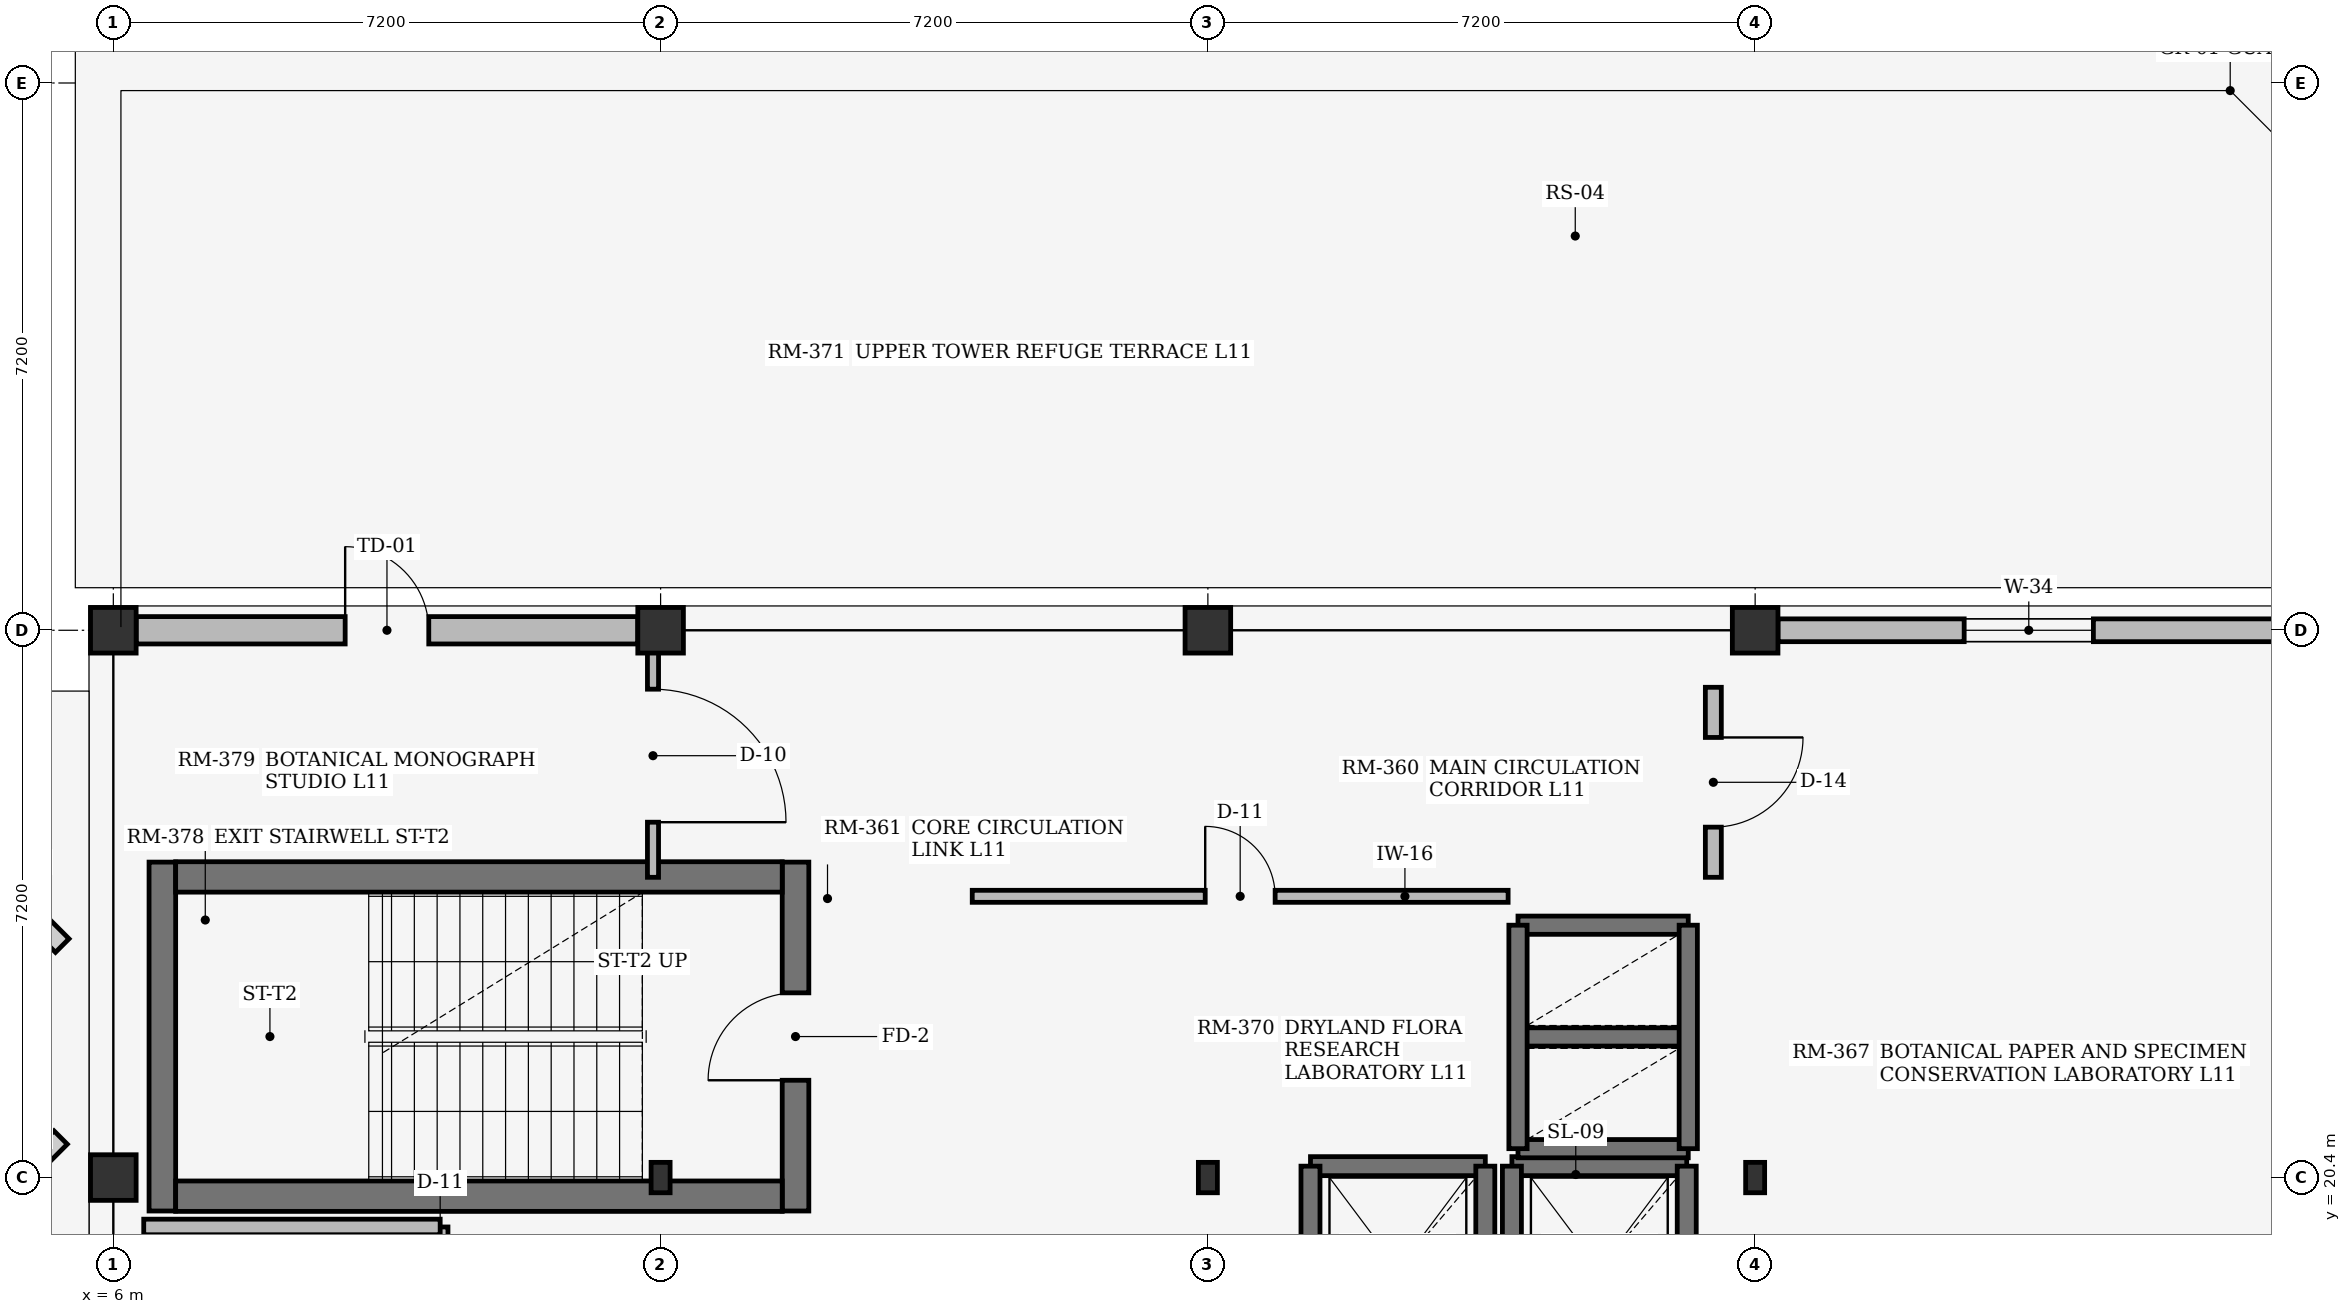
"""IFC4 building model, lengths in metres.
Left out: names, types, materials, properties, quantities, classifications, styles, units other than length and angle.
Written with IfcOpenShell. Run it as: python <this file> out.ifc"""

import sys

from ifc_helpers import new_model, si_unit, direction, frame, frame_2d, origin, origin_2d, place, context, subcontext, project, spatial, rectangle, i_section, extrude, element, fill, save


model = new_model("IFC4")
c1 = context("Model", 3, precision=1e-05, world=origin(), true_north=direction((0.0, 1.0)))
c2 = subcontext(c1, "Body", "Model", "MODEL_VIEW")
j1 = project(units=[si_unit("LENGTHUNIT", "METRE"), si_unit("PLANEANGLEUNIT", "RADIAN")], contexts=[c1])
p1 = place(None, origin())
s1 = spatial("IfcSite", under=j1, at=p1, CompositionType="ELEMENT")
p2 = place(p1, origin())
s2 = spatial("IfcBuilding", under=s1, at=p2, CompositionType="ELEMENT")
p3 = place(p2, frame((0.0, 0.0, 44.4)))
s3 = spatial("IfcBuildingStorey", under=s2, at=p3, CompositionType="ELEMENT", Elevation=44.4)
for number, where, z_axis, x_axis in (
    (1, (6.0, 20.4, 0.0), (0.0, 0.0, 1.0), (1.0, 0.0, 0.0)),
    (2, (6.0, 27.6, 0.0), (0.0, 0.0, 1.0), (1.0, 0.0, 0.0)),
):
    element("IfcColumn", number, at=place(p3, frame(where, z_axis=z_axis, x_axis=x_axis)), inside=s3, PredefinedType="COLUMN", context=c2, shape_type="SweptSolid", body=[
        extrude(rectangle(XDim=0.6, YDim=0.6, at=origin_2d()), origin(), (0.0, 0.0, 1.0), 3.69),
    ])
p4 = place(p3, frame((13.2, 20.4, 0.0), z_axis=(0.0, 0.0, 1.0), x_axis=(1.0, 0.0, 0.0)))
e3 = element("IfcColumn", 3, at=p4, inside=s3, PredefinedType="COLUMN", context=c2, shape_type="SweptSolid", body=[
    extrude(i_section(OverallWidth=0.25, OverallDepth=0.4, WebThickness=0.01, FlangeThickness=0.013, at=origin_2d()), origin(), (0.0, 0.0, 1.0), 3.69),
])
p5 = place(p3, frame((13.2, 27.6, 0.0), z_axis=(0.0, 0.0, 1.0), x_axis=(1.0, 0.0, 0.0)))
e4 = element("IfcColumn", 4, at=p5, inside=s3, PredefinedType="COLUMN", context=c2, shape_type="SweptSolid", body=[
    extrude(rectangle(XDim=0.6, YDim=0.6, at=origin_2d()), origin(), (0.0, 0.0, 1.0), 3.69),
])
p6 = place(p3, frame((20.4, 20.4, 0.0), z_axis=(0.0, 0.0, 1.0), x_axis=(1.0, 0.0, 0.0)))
e5 = element("IfcColumn", 5, at=p6, inside=s3, PredefinedType="COLUMN", context=c2, shape_type="SweptSolid", body=[
    extrude(i_section(OverallWidth=0.25, OverallDepth=0.4, WebThickness=0.01, FlangeThickness=0.013, at=origin_2d()), origin(), (0.0, 0.0, 1.0), 3.69),
])
p7 = place(p3, frame((20.4, 27.6, 0.0), z_axis=(0.0, 0.0, 1.0), x_axis=(1.0, 0.0, 0.0)))
e6 = element("IfcColumn", 6, at=p7, inside=s3, PredefinedType="COLUMN", context=c2, shape_type="SweptSolid", body=[
    extrude(rectangle(XDim=0.6, YDim=0.6, at=origin_2d()), origin(), (0.0, 0.0, 1.0), 3.69),
])
p8 = place(p3, frame((27.6, 20.4, 0.0), z_axis=(0.0, 0.0, 1.0), x_axis=(1.0, 0.0, 0.0)))
e7 = element("IfcColumn", 7, at=p8, inside=s3, PredefinedType="COLUMN", context=c2, shape_type="SweptSolid", body=[
    extrude(i_section(OverallWidth=0.25, OverallDepth=0.4, WebThickness=0.01, FlangeThickness=0.013, at=origin_2d()), origin(), (0.0, 0.0, 1.0), 3.69),
])
p9 = place(p3, frame((27.6, 27.6, 0.0), z_axis=(0.0, 0.0, 1.0), x_axis=(1.0, 0.0, 0.0)))
e8 = element("IfcColumn", 8, at=p9, inside=s3, PredefinedType="COLUMN", context=c2, shape_type="SweptSolid", body=[
    extrude(rectangle(XDim=0.6, YDim=0.6, at=origin_2d()), origin(), (0.0, 0.0, 1.0), 3.69),
])
p10 = place(p3, frame((6.3, 27.6, 0.0), z_axis=(0.0, 0.0, 1.0), x_axis=(1.0, 0.0, 0.0)))
e9 = element("IfcWall", 9, at=p10, inside=s3, PredefinedType="STANDARD", context=c2, shape_type="SweptSolid", body=[
    extrude(rectangle(XDim=6.6, YDim=0.36, at=frame_2d((3.3, 0.0))), origin(), (0.0, 0.0, 1.0), 3.17),
])
p11 = place(p10, frame((2.75, 0.0, 0.0)))
e10 = element("IfcOpeningElement", 10, at=p11, cuts=e9, PredefinedType="OPENING", context=c2, shape_type="SweptSolid", body=[
    extrude(rectangle(XDim=1.1, YDim=2.15, at=frame_2d((0.55, 1.075))), frame((0.0, 0.19, 0.0), z_axis=(0.0, -1.0, 0.0), x_axis=(1.0, 0.0, 0.0)), (0.0, 0.0, 1.0), 0.38),
])
p12 = place(p3, frame((27.9, 27.6, 0.0), z_axis=(0.0, 0.0, 1.0), x_axis=(1.0, 0.0, 0.0)))
e11 = element("IfcWall", 11, at=p12, inside=s3, PredefinedType="STANDARD", context=c2, shape_type="SweptSolid", body=[
    extrude(rectangle(XDim=6.6, YDim=0.3, at=frame_2d((3.3, 0.0))), origin(), (0.0, 0.0, 1.0), 3.17),
])
p13 = place(p12, frame((2.45, 0.0, 0.75)))
e12 = element("IfcOpeningElement", 12, at=p13, cuts=e11, PredefinedType="OPENING", context=c2, shape_type="SweptSolid", body=[
    extrude(rectangle(XDim=1.7, YDim=1.35, at=frame_2d((0.85, 0.675))), frame((0.0, 0.16, 0.0), z_axis=(0.0, -1.0, 0.0), x_axis=(1.0, 0.0, 0.0)), (0.0, 0.0, 1.0), 0.32),
])
p14 = place(p3, frame((14.975, 24.55, 0.0), z_axis=(0.0, 0.0, 1.0), x_axis=(0.0, -1.0, 0.0)))
e13 = element("IfcWall", 13, at=p14, inside=s3, PredefinedType="SHEAR", context=c2, shape_type="SweptSolid", body=[
    extrude(rectangle(XDim=4.59, YDim=0.35, at=frame_2d((2.295, 0.0))), origin(), (0.0, 0.0, 1.0), 3.69),
])
p15 = place(p14, frame((1.72, 0.0, 0.0)))
e14 = element("IfcOpeningElement", 14, at=p15, cuts=e13, PredefinedType="OPENING", context=c2, shape_type="SweptSolid", body=[
    extrude(rectangle(XDim=1.15, YDim=2.2, at=frame_2d((0.575, 1.1))), frame((0.0, 0.185, 0.0), z_axis=(0.0, -1.0, 0.0), x_axis=(1.0, 0.0, 0.0)), (0.0, 0.0, 1.0), 0.37),
])
p16 = place(p3, frame((6.645, 24.55, 0.0), z_axis=(0.0, 0.0, 1.0), x_axis=(0.0, -1.0, 0.0)))
e15 = element("IfcWall", 15, at=p16, inside=s3, PredefinedType="SHEAR", context=c2, shape_type="SweptSolid", body=[
    extrude(rectangle(XDim=4.59, YDim=0.35, at=frame_2d((2.295, 0.0))), origin(), (0.0, 0.0, 1.0), 3.69),
])
for number, where, z_axis, x_axis in (
    (16, (14.8, 24.355, 0.0), (0.0, 0.0, 1.0), (-1.0, 0.0, 0.0)),
    (17, (14.8, 20.155, 0.0), (0.0, 0.0, 1.0), (-1.0, 0.0, 0.0)),
):
    element("IfcWall", number, at=place(p3, frame(where, z_axis=z_axis, x_axis=x_axis)), inside=s3, PredefinedType="SHEAR", context=c2, shape_type="SweptSolid", body=[
        extrude(rectangle(XDim=7.98, YDim=0.4, at=frame_2d((3.99, 0.0))), origin(), (0.0, 0.0, 1.0), 3.69),
    ])
p17 = place(p3, frame((21.75, 20.55, 0.0), z_axis=(0.0, 0.0, 1.0), x_axis=(1.0, 0.0, 0.0)))
e18 = element("IfcWall", 18, at=p17, inside=s3, PredefinedType="SHEAR", context=c2, shape_type="SweptSolid", body=[
    extrude(rectangle(XDim=2.3, YDim=0.25, at=frame_2d((1.15, 0.0))), origin(), (0.0, 0.0, 1.0), 3.69),
])
for number, where, z_axis, x_axis in (
    (19, (21.75, 17.85, 0.0), (0.0, 0.0, 1.0), (0.0, 1.0, 0.0)),
    (20, (24.05, 17.85, 0.0), (0.0, 0.0, 1.0), (0.0, 1.0, 0.0)),
):
    element("IfcWall", number, at=place(p3, frame(where, z_axis=z_axis, x_axis=x_axis)), inside=s3, PredefinedType="SHEAR", context=c2, shape_type="SweptSolid", body=[
        extrude(rectangle(XDim=2.7, YDim=0.25, at=frame_2d((1.35, 0.0))), origin(), (0.0, 0.0, 1.0), 3.69),
    ])
p18 = place(p3, frame((24.4, 20.55, 0.0), z_axis=(0.0, 0.0, 1.0), x_axis=(1.0, 0.0, 0.0)))
e21 = element("IfcWall", 21, at=p18, inside=s3, PredefinedType="SHEAR", context=c2, shape_type="SweptSolid", body=[
    extrude(rectangle(XDim=2.3, YDim=0.25, at=frame_2d((1.15, 0.0))), origin(), (0.0, 0.0, 1.0), 3.69),
])
for number, where, z_axis, x_axis in (
    (22, (24.4, 17.85, 0.0), (0.0, 0.0, 1.0), (0.0, 1.0, 0.0)),
    (23, (26.7, 17.85, 0.0), (0.0, 0.0, 1.0), (0.0, 1.0, 0.0)),
):
    element("IfcWall", number, at=place(p3, frame(where, z_axis=z_axis, x_axis=x_axis)), inside=s3, PredefinedType="SHEAR", context=c2, shape_type="SweptSolid", body=[
        extrude(rectangle(XDim=2.7, YDim=0.25, at=frame_2d((1.35, 0.0))), origin(), (0.0, 0.0, 1.0), 3.69),
    ])
for number, where, z_axis, x_axis in (
    (24, (24.48, 20.78, 0.0), (0.0, 0.0, 1.0), (1.0, 0.0, 0.0)),
    (25, (24.48, 22.25, 0.0), (0.0, 0.0, 1.0), (1.0, 0.0, 0.0)),
    (26, (24.48, 23.72, 0.0), (0.0, 0.0, 1.0), (1.0, 0.0, 0.0)),
):
    element("IfcWall", number, at=place(p3, frame(where, z_axis=z_axis, x_axis=x_axis)), inside=s3, PredefinedType="SHEAR", context=c2, shape_type="SweptSolid", body=[
        extrude(rectangle(XDim=2.24, YDim=0.24, at=frame_2d((1.12, 0.0))), origin(), (0.0, 0.0, 1.0), 3.69),
    ])
for number, where, z_axis, x_axis in (
    (27, (24.48, 20.78, 0.0), (0.0, 0.0, 1.0), (0.0, 1.0, 0.0)),
    (28, (26.72, 20.78, 0.0), (0.0, 0.0, 1.0), (0.0, 1.0, 0.0)),
):
    element("IfcWall", number, at=place(p3, frame(where, z_axis=z_axis, x_axis=x_axis)), inside=s3, PredefinedType="SHEAR", context=c2, shape_type="SweptSolid", body=[
        extrude(rectangle(XDim=2.94, YDim=0.24, at=frame_2d((1.47, 0.0))), origin(), (0.0, 0.0, 1.0), 3.69),
    ])
p19 = place(p3, frame((10.3, 18.0, 0.0), z_axis=(0.0, 0.0, 1.0), x_axis=(0.0, 1.0, 0.0)))
e29 = element("IfcWall", 29, at=p19, inside=s3, PredefinedType="PLUMBINGWALL", context=c2, shape_type="SweptSolid", body=[
    extrude(rectangle(XDim=1.75, YDim=0.205, at=frame_2d((0.875, 0.0))), origin(), (0.0, 0.0, 1.0), 3.67),
])
p20 = place(p19, frame((0.415, 0.0, 0.0)))
e30 = element("IfcOpeningElement", 30, at=p20, cuts=e29, PredefinedType="OPENING", context=c2, shape_type="SweptSolid", body=[
    extrude(rectangle(XDim=0.92, YDim=2.1, at=frame_2d((0.46, 1.05))), frame((0.0, 0.113, 0.0), z_axis=(0.0, -1.0, 0.0), x_axis=(1.0, 0.0, 0.0)), (0.0, 0.0, 1.0), 0.225),
])
p21 = place(p3, frame((6.4, 19.75, 0.0), z_axis=(0.0, 0.0, 1.0), x_axis=(1.0, 0.0, 0.0)))
e31 = element("IfcWall", 31, at=p21, inside=s3, PredefinedType="PLUMBINGWALL", context=c2, shape_type="SweptSolid", body=[
    extrude(rectangle(XDim=3.9, YDim=0.205, at=frame_2d((1.95, 0.0))), origin(), (0.0, 0.0, 1.0), 3.67),
])
p22 = place(p3, frame((13.1, 24.35, 0.0), z_axis=(0.0, 0.0, 1.0), x_axis=(0.0, 1.0, 0.0)))
e32 = element("IfcWall", 32, at=p22, inside=s3, PredefinedType="PARTITIONING", context=c2, shape_type="SweptSolid", body=[
    extrude(rectangle(XDim=3.2, YDim=0.146, at=frame_2d((1.6, 0.0))), origin(), (0.0, 0.0, 1.0), 3.18),
])
p23 = place(p22, frame((0.725, 0.0, 0.0)))
e33 = element("IfcOpeningElement", 33, at=p23, cuts=e32, PredefinedType="OPENING", context=c2, shape_type="SweptSolid", body=[
    extrude(rectangle(XDim=1.75, YDim=2.3, at=frame_2d((0.875, 1.15))), frame((0.0, 0.083, 0.0), z_axis=(0.0, -1.0, 0.0), x_axis=(1.0, 0.0, 0.0)), (0.0, 0.0, 1.0), 0.166),
])
p24 = place(p3, frame((17.3, 24.1, 0.0), z_axis=(0.0, 0.0, 1.0), x_axis=(1.0, 0.0, 0.0)))
e34 = element("IfcWall", 34, at=p24, inside=s3, PredefinedType="PARTITIONING", context=c2, shape_type="SweptSolid", body=[
    extrude(rectangle(XDim=7.05, YDim=0.158, at=frame_2d((3.525, 0.0))), origin(), (0.0, 0.0, 1.0), 3.67),
])
p25 = place(p24, frame((3.065, 0.0, 0.0)))
e35 = element("IfcOpeningElement", 35, at=p25, cuts=e34, PredefinedType="OPENING", context=c2, shape_type="SweptSolid", body=[
    extrude(rectangle(XDim=0.92, YDim=2.1, at=frame_2d((0.46, 1.05))), frame((0.0, 0.089, 0.0), z_axis=(0.0, -1.0, 0.0), x_axis=(1.0, 0.0, 0.0)), (0.0, 0.0, 1.0), 0.178),
])
p26 = place(p3, frame((27.05, 24.35, 0.0), z_axis=(0.0, 0.0, 1.0), x_axis=(0.0, 1.0, 0.0)))
e36 = element("IfcWall", 36, at=p26, inside=s3, PredefinedType="PARTITIONING", context=c2, shape_type="SweptSolid", body=[
    extrude(rectangle(XDim=2.5, YDim=0.21, at=frame_2d((1.25, 0.0))), origin(), (0.0, 0.0, 1.0), 3.67),
])
p27 = place(p26, frame((0.66, 0.0, 0.0)))
e37 = element("IfcOpeningElement", 37, at=p27, cuts=e36, PredefinedType="OPENING", context=c2, shape_type="SweptSolid", body=[
    extrude(rectangle(XDim=1.18, YDim=2.1, at=frame_2d((0.59, 1.05))), frame((0.0, 0.115, 0.0), z_axis=(0.0, -1.0, 0.0), x_axis=(1.0, 0.0, 0.0)), (0.0, 0.0, 1.0), 0.23),
])
p28 = place(p11, origin())
e38 = element("IfcDoor", 38, at=p28, inside=s3, OperationType="SINGLE_SWING_LEFT", PredefinedType="DOOR", context=c2, shape_type="SweptSolid", body=[
    extrude(rectangle(XDim=1.1, YDim=2.15, at=frame_2d((0.55, 1.075))), frame((0.0, 0.025, 0.0), z_axis=(0.0, -1.0, 0.0), x_axis=(1.0, 0.0, 0.0)), (0.0, 0.0, 1.0), 0.05),
])
fill(e10, e38)
p29 = place(p13, origin())
e39 = element("IfcWindow", 39, at=p29, inside=s3, PartitioningType="SINGLE_PANEL", PredefinedType="WINDOW", context=c2, shape_type="SweptSolid", body=[
    extrude(rectangle(XDim=1.7, YDim=1.35, at=frame_2d((0.85, 0.675))), frame((0.0, 0.03, 0.0), z_axis=(0.0, -1.0, 0.0), x_axis=(1.0, 0.0, 0.0)), (0.0, 0.0, 1.0), 0.06),
])
fill(e12, e39)
p30 = place(p15, origin())
e40 = element("IfcDoor", 40, at=p30, inside=s3, OperationType="SINGLE_SWING_RIGHT", PredefinedType="DOOR", context=c2, shape_type="SweptSolid", body=[
    extrude(rectangle(XDim=1.15, YDim=2.2, at=frame_2d((0.575, 1.1))), frame((0.0, 0.025, 0.0), z_axis=(0.0, -1.0, 0.0), x_axis=(1.0, 0.0, 0.0)), (0.0, 0.0, 1.0), 0.05),
])
fill(e14, e40)
p31 = place(p23, frame((1.75, 0.0, 0.0), z_axis=(0.0, 0.0, 1.0), x_axis=(-1.0, 0.0, 0.0)))
e41 = element("IfcDoor", 41, at=p31, inside=s3, OperationType="DOUBLE_DOOR_SINGLE_SWING", PredefinedType="DOOR", context=c2, shape_type="SweptSolid", body=[
    extrude(rectangle(XDim=1.75, YDim=2.3, at=frame_2d((0.875, 1.15))), frame((0.0, 0.025, 0.0), z_axis=(0.0, -1.0, 0.0), x_axis=(1.0, 0.0, 0.0)), (0.0, 0.0, 1.0), 0.05),
])
fill(e33, e41)
p32 = place(p25, origin())
e42 = element("IfcDoor", 42, at=p32, inside=s3, OperationType="SINGLE_SWING_LEFT", PredefinedType="DOOR", context=c2, shape_type="SweptSolid", body=[
    extrude(rectangle(XDim=0.92, YDim=2.1, at=frame_2d((0.46, 1.05))), frame((0.0, 0.025, 0.0), z_axis=(0.0, -1.0, 0.0), x_axis=(1.0, 0.0, 0.0)), (0.0, 0.0, 1.0), 0.05),
])
fill(e35, e42)
p33 = place(p27, origin())
e43 = element("IfcDoor", 43, at=p33, inside=s3, OperationType="SINGLE_SWING_RIGHT", PredefinedType="DOOR", context=c2, shape_type="SweptSolid", body=[
    extrude(rectangle(XDim=1.18, YDim=2.1, at=frame_2d((0.59, 1.05))), frame((0.0, 0.025, 0.0), z_axis=(0.0, -1.0, 0.0), x_axis=(1.0, 0.0, 0.0)), (0.0, 0.0, 1.0), 0.05),
])
fill(e37, e43)
save(model, sys.argv[1])
